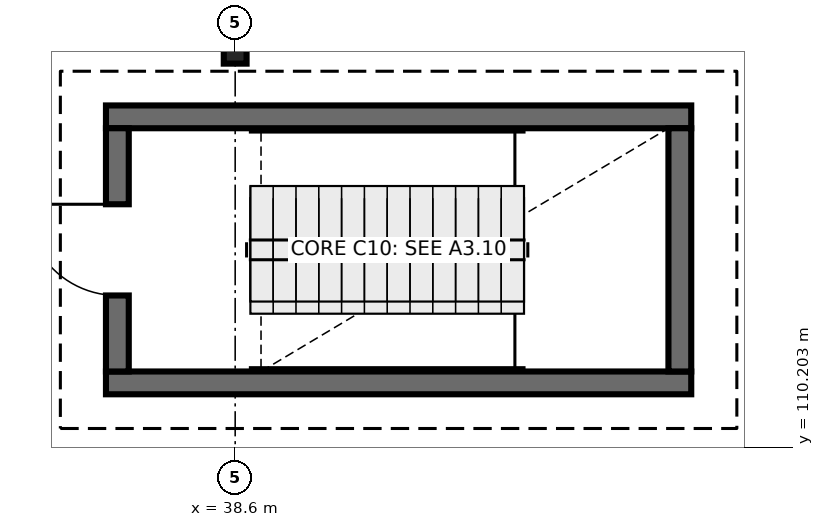
"""IFC4 building model, lengths in metres.
Left out: names, types, materials, properties, quantities, classifications, styles, units other than length and angle.
Written with IfcOpenShell. Run it as: python <this file> out.ifc"""

import sys

from ifc_helpers import new_model, si_unit, direction, frame, frame_2d, origin, origin_2d, place, context, subcontext, project, spatial, rectangle, i_section, extrude, element, fill, save


model = new_model("IFC4")
c1 = context("Model", 3, precision=1e-05, world=origin(), true_north=direction((0.0, 1.0)))
c2 = subcontext(c1, "Body", "Model", "MODEL_VIEW")
j1 = project(units=[si_unit("LENGTHUNIT", "METRE"), si_unit("PLANEANGLEUNIT", "RADIAN")], contexts=[c1])
p1 = place(None, origin())
s1 = spatial("IfcSite", under=j1, at=p1, CompositionType="ELEMENT")
p2 = place(p1, origin())
s2 = spatial("IfcBuilding", under=s1, at=p2, CompositionType="ELEMENT")
p3 = place(p2, origin())
s3 = spatial("IfcBuildingStorey", under=s2, at=p3, CompositionType="ELEMENT", Elevation=0.0)
p4 = place(p3, frame((38.6, 115.5, 0.0), z_axis=(0.0, 0.0, 1.0), x_axis=(1.0, 0.0, 0.0)))
e1 = element("IfcColumn", 1, at=p4, inside=s3, PredefinedType="COLUMN", context=c2, shape_type="SweptSolid", body=[
    extrude(i_section(OverallWidth=0.3, OverallDepth=0.5, WebThickness=0.014, FlangeThickness=0.028, FilletRadius=0.027, at=origin_2d()), origin(), (0.0, 0.0, 1.0), 4.8),
])
for number, where, z_axis, x_axis in (
    (2, (36.9, 111.05, 0.0), (0.0, 0.0, 1.0), (1.0, 0.0, 0.0)),
    (3, (44.6, 114.55, 0.0), (0.0, 0.0, 1.0), (-1.0, 0.0, 0.0)),
):
    element("IfcWall", number, at=place(p3, frame(where, z_axis=z_axis, x_axis=x_axis)), inside=s3, PredefinedType="SHEAR", context=c2, shape_type="SweptSolid", body=[
        extrude(rectangle(XDim=7.7, YDim=0.3, at=frame_2d((3.85, 0.0))), origin(), (0.0, 0.0, 1.0), 4.8),
    ])
p5 = place(p3, frame((37.05, 114.4, 0.0), z_axis=(0.0, 0.0, 1.0), x_axis=(0.0, -1.0, 0.0)))
e4 = element("IfcWall", 4, at=p5, inside=s3, PredefinedType="SHEAR", context=c2, shape_type="SweptSolid", body=[
    extrude(rectangle(XDim=3.2, YDim=0.3, at=frame_2d((1.6, 0.0))), origin(), (0.0, 0.0, 1.0), 4.8),
])
p6 = place(p5, frame((1.0, 0.0, 0.0)))
e5 = element("IfcOpeningElement", 5, at=p6, cuts=e4, PredefinedType="OPENING", context=c2, shape_type="SweptSolid", body=[
    extrude(rectangle(XDim=1.2, YDim=2.15, at=frame_2d((0.6, 1.075))), frame((0.0, 0.16, 0.0), z_axis=(0.0, -1.0, 0.0), x_axis=(1.0, 0.0, 0.0)), (0.0, 0.0, 1.0), 0.32),
])
p7 = place(p3, frame((44.45, 111.2, 0.0), z_axis=(0.0, 0.0, 1.0), x_axis=(0.0, 1.0, 0.0)))
e6 = element("IfcWall", 6, at=p7, inside=s3, PredefinedType="SHEAR", context=c2, shape_type="SweptSolid", body=[
    extrude(rectangle(XDim=3.2, YDim=0.3, at=frame_2d((1.6, 0.0))), origin(), (0.0, 0.0, 1.0), 4.8),
])
p8 = place(p6, frame((1.2, 0.0, 0.0), z_axis=(0.0, 0.0, 1.0), x_axis=(-1.0, 0.0, 0.0)))
e7 = element("IfcDoor", 7, at=p8, inside=s3, OperationType="SINGLE_SWING_LEFT", PredefinedType="DOOR", context=c2, shape_type="SweptSolid", body=[
    extrude(rectangle(XDim=1.2, YDim=2.15, at=frame_2d((0.6, 1.075))), frame((0.0, 0.025, 0.0), z_axis=(0.0, -1.0, 0.0), x_axis=(1.0, 0.0, 0.0)), (0.0, 0.0, 1.0), 0.05),
])
fill(e5, e7)
save(model, sys.argv[1])
